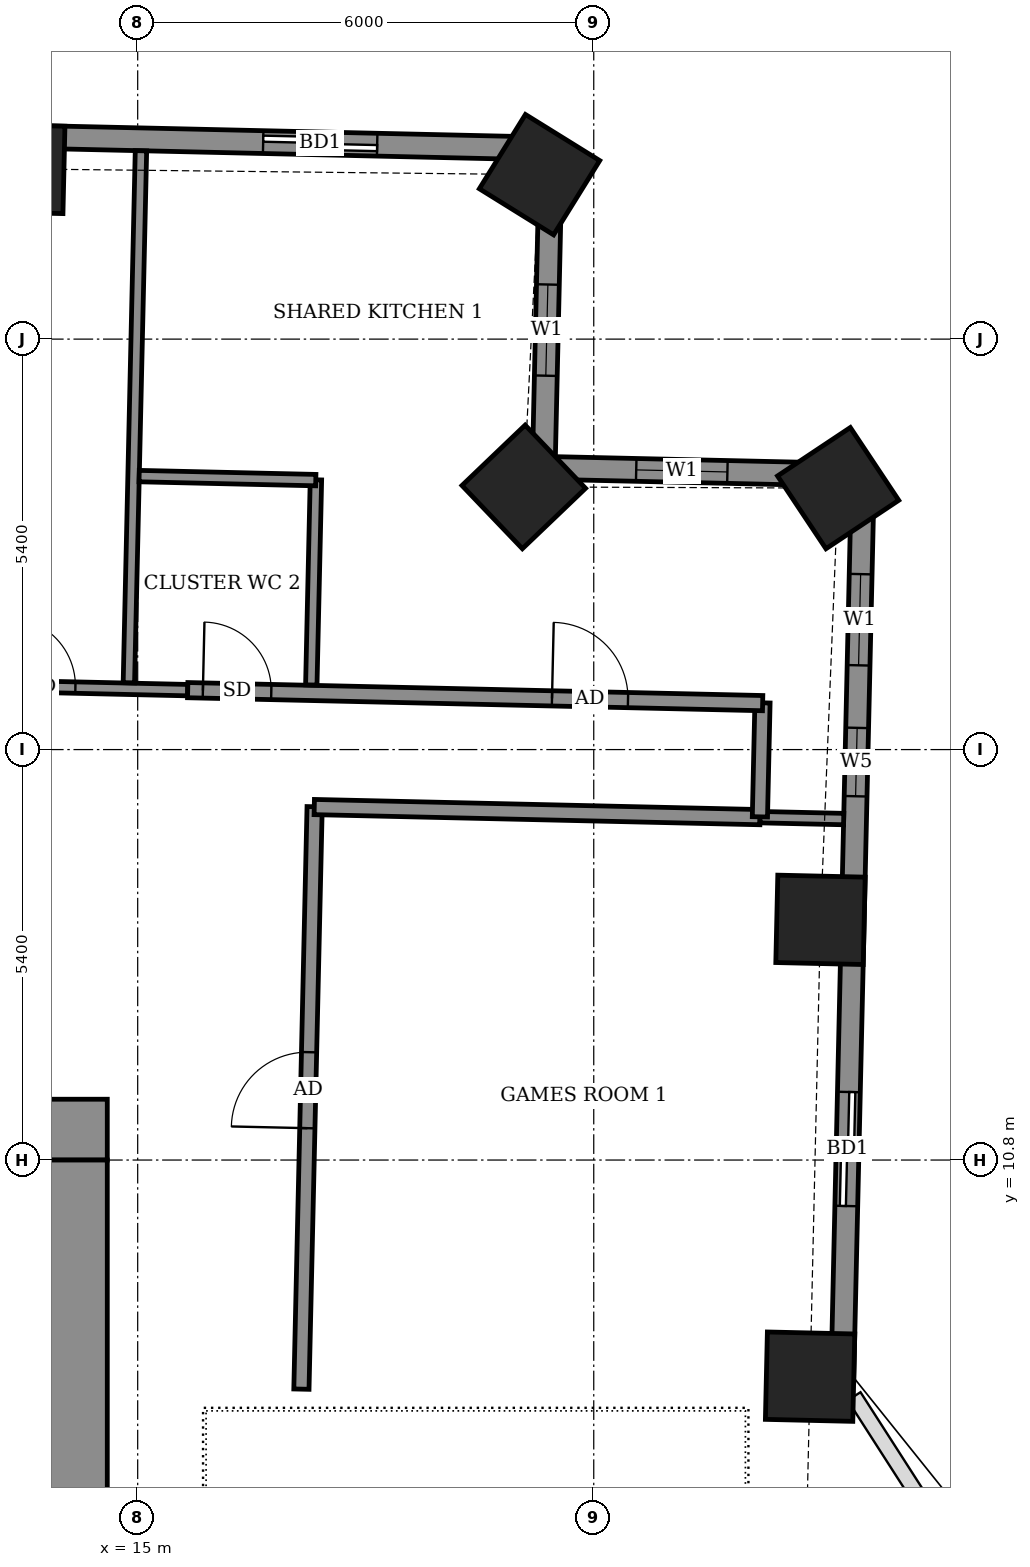
"""IFC4 building model, lengths in metres.
Left out: names, types, materials, properties, quantities, classifications, styles, units other than length and angle.
Written with IfcOpenShell. Run it as: python <this file> out.ifc"""

import sys

from ifc_helpers import new_model, si_unit, direction, frame, frame_2d, origin, origin_2d, place, context, subcontext, project, spatial, rectangle, extrude, element, fill, save


model = new_model("IFC4")
c1 = context("Model", 3, precision=1e-05, world=origin(), true_north=direction((0.0, 1.0)))
c2 = subcontext(c1, "Body", "Model", "MODEL_VIEW")
j1 = project(units=[si_unit("LENGTHUNIT", "METRE"), si_unit("PLANEANGLEUNIT", "RADIAN")], contexts=[c1])
p1 = place(None, origin())
s1 = spatial("IfcSite", under=j1, at=p1, CompositionType="ELEMENT")
p2 = place(p1, origin())
s2 = spatial("IfcBuilding", under=s1, at=p2, CompositionType="ELEMENT")
p3 = place(p2, frame((0.0, 0.0, 201.5)))
s3 = spatial("IfcBuildingStorey", under=s2, at=p3, CompositionType="ELEMENT", Elevation=201.5)
for number, where, z_axis, x_axis in (
    (1, (23.846, 7.95, -0.55), (0.0, 0.0, 1.0), (0.023, 1.0, 0.0)),
    (2, (23.983, 13.96, -0.55), (0.0, 0.0, 1.0), (0.023, 1.0, 0.0)),
    (3, (24.215, 19.639, -0.55), (0.0, 0.0, 1.0), (-0.554, 0.833, 0.0)),
    (4, (20.079, 19.656, -0.55), (0.0, 0.0, 1.0), (-0.691, 0.723, 0.0)),
    (5, (20.287, 23.763, -0.55), (0.0, 0.0, 1.0), (-0.85, 0.527, 0.0)),
    (6, (13.455, 23.839, -0.55), (0.0, 0.0, 1.0), (-1.0, 0.023, 0.0)),
):
    element("IfcColumn", number, at=place(p3, frame(where, z_axis=z_axis, x_axis=x_axis)), inside=s3, PredefinedType="COLUMN", context=c2, shape_type="SweptSolid", body=[
        extrude(rectangle(XDim=1.15, YDim=1.15, at=origin_2d()), origin(), (0.0, 0.0, 1.0), 3.6),
    ])
p4 = place(p3, frame((24.27, 7.885, 0.0), z_axis=(0.0, 0.0, 1.0), x_axis=(0.022715362207, 0.999741972871, 0.0)))
e7 = element("IfcWall", 7, at=p4, inside=s3, PredefinedType="SOLIDWALL", context=c2, shape_type="SweptSolid", body=[
    extrude(rectangle(XDim=11.93, YDim=0.3, at=frame_2d((5.965, 0.0))), origin(), (0.0, 0.0, 1.0), 3.05),
])
p5 = place(p4, frame((2.311, 0.0, 0.0)))
e8 = element("IfcOpeningElement", 8, at=p5, cuts=e7, PredefinedType="OPENING", context=c2, shape_type="SweptSolid", body=[
    extrude(rectangle(XDim=1.5, YDim=2.4, at=frame_2d((0.75, 1.2))), frame((0.0, 0.16, 0.0), z_axis=(0.0, -1.0, 0.0), x_axis=(1.0, 0.0, 0.0)), (0.0, 0.0, 1.0), 0.32),
])
p6 = place(p4, frame((7.703, 0.0, 0.9)))
e9 = element("IfcOpeningElement", 9, at=p6, cuts=e7, PredefinedType="OPENING", context=c2, shape_type="SweptSolid", body=[
    extrude(rectangle(XDim=0.9, YDim=1.5, at=frame_2d((0.45, 0.75))), frame((0.0, 0.16, 0.0), z_axis=(0.0, -1.0, 0.0), x_axis=(1.0, 0.0, 0.0)), (0.0, 0.0, 1.0), 0.32),
])
p7 = place(p4, frame((9.426, 0.0, 0.9)))
e10 = element("IfcOpeningElement", 10, at=p7, cuts=e7, PredefinedType="OPENING", context=c2, shape_type="SweptSolid", body=[
    extrude(rectangle(XDim=1.2, YDim=1.5, at=frame_2d((0.6, 0.75))), frame((0.0, 0.16, 0.0), z_axis=(0.0, -1.0, 0.0), x_axis=(1.0, 0.0, 0.0)), (0.0, 0.0, 1.0), 0.32),
])
p8 = place(p3, frame((24.541, 19.812, 0.0), z_axis=(0.0, 0.0, 1.0), x_axis=(-0.999744320311, 0.022611811187, 0.0)))
e11 = element("IfcWall", 11, at=p8, inside=s3, PredefinedType="SOLIDWALL", context=c2, shape_type="SweptSolid", body=[
    extrude(rectangle(XDim=4.2, YDim=0.3, at=frame_2d((2.1, 0.0))), origin(), (0.0, 0.0, 1.0), 2.55),
])
p9 = place(p8, frame((1.783, 0.0, 0.9)))
e12 = element("IfcOpeningElement", 12, at=p9, cuts=e11, PredefinedType="OPENING", context=c2, shape_type="SweptSolid", body=[
    extrude(rectangle(XDim=1.2, YDim=1.5, at=frame_2d((0.6, 0.75))), frame((0.0, 0.16, 0.0), z_axis=(0.0, -1.0, 0.0), x_axis=(1.0, 0.0, 0.0)), (0.0, 0.0, 1.0), 0.32),
])
p10 = place(p3, frame((20.342, 19.907, 0.0), z_axis=(0.0, 0.0, 1.0), x_axis=(0.022611811187, 0.999744320311, 0.0)))
e13 = element("IfcWall", 13, at=p10, inside=s3, PredefinedType="SOLIDWALL", context=c2, shape_type="SweptSolid", body=[
    extrude(rectangle(XDim=4.2, YDim=0.3, at=frame_2d((2.1, 0.0))), origin(), (0.0, 0.0, 1.0), 2.55),
])
p11 = place(p10, frame((1.212, 0.0, 0.9)))
e14 = element("IfcOpeningElement", 14, at=p11, cuts=e13, PredefinedType="OPENING", context=c2, shape_type="SweptSolid", body=[
    extrude(rectangle(XDim=1.2, YDim=1.5, at=frame_2d((0.6, 0.75))), frame((0.0, 0.16, 0.0), z_axis=(0.0, -1.0, 0.0), x_axis=(1.0, 0.0, 0.0)), (0.0, 0.0, 1.0), 0.32),
])
p12 = place(p3, frame((20.437, 24.106, 0.0), z_axis=(0.0, 0.0, 1.0), x_axis=(-0.999742506232, 0.022691875925, 0.0)))
e15 = element("IfcWall", 15, at=p12, inside=s3, PredefinedType="SOLIDWALL", context=c2, shape_type="SweptSolid", body=[
    extrude(rectangle(XDim=42.444, YDim=0.3, at=frame_2d((21.222, 0.0))), origin(), (0.0, 0.0, 1.0), 3.05),
])
p13 = place(p12, frame((2.287, 0.0, 0.0)))
e16 = element("IfcOpeningElement", 16, at=p13, cuts=e15, PredefinedType="OPENING", context=c2, shape_type="SweptSolid", body=[
    extrude(rectangle(XDim=1.5, YDim=2.4, at=frame_2d((0.75, 1.2))), frame((0.0, 0.16, 0.0), z_axis=(0.0, -1.0, 0.0), x_axis=(1.0, 0.0, 0.0)), (0.0, 0.0, 1.0), 0.32),
])
p14 = place(p12, frame((7.947, 0.0, 0.0)))
e17 = element("IfcOpeningElement", 17, at=p14, cuts=e15, PredefinedType="OPENING", context=c2, shape_type="SweptSolid", body=[
    extrude(rectangle(XDim=1.5, YDim=2.4, at=frame_2d((0.75, 1.2))), frame((0.0, 0.16, 0.0), z_axis=(0.0, -1.0, 0.0), x_axis=(1.0, 0.0, 0.0)), (0.0, 0.0, 1.0), 0.32),
])
p15 = place(p12, frame((11.184, 0.0, 0.0)))
e18 = element("IfcOpeningElement", 18, at=p15, cuts=e15, PredefinedType="OPENING", context=c2, shape_type="SweptSolid", body=[
    extrude(rectangle(XDim=1.5, YDim=2.4, at=frame_2d((0.75, 1.2))), frame((0.0, 0.16, 0.0), z_axis=(0.0, -1.0, 0.0), x_axis=(1.0, 0.0, 0.0)), (0.0, 0.0, 1.0), 0.32),
])
p16 = place(p12, frame((16.469, 0.0, 0.0)))
e19 = element("IfcOpeningElement", 19, at=p16, cuts=e15, PredefinedType="OPENING", context=c2, shape_type="SweptSolid", body=[
    extrude(rectangle(XDim=1.5, YDim=2.4, at=frame_2d((0.75, 1.2))), frame((0.0, 0.16, 0.0), z_axis=(0.0, -1.0, 0.0), x_axis=(1.0, 0.0, 0.0)), (0.0, 0.0, 1.0), 0.32),
])
p17 = place(p12, frame((22.02, 0.0, 0.0)))
e20 = element("IfcOpeningElement", 20, at=p17, cuts=e15, PredefinedType="OPENING", context=c2, shape_type="SweptSolid", body=[
    extrude(rectangle(XDim=1.5, YDim=2.4, at=frame_2d((0.75, 1.2))), frame((0.0, 0.16, 0.0), z_axis=(0.0, -1.0, 0.0), x_axis=(1.0, 0.0, 0.0)), (0.0, 0.0, 1.0), 0.32),
])
p18 = place(p12, frame((25.257, 0.0, 0.0)))
e21 = element("IfcOpeningElement", 21, at=p18, cuts=e15, PredefinedType="OPENING", context=c2, shape_type="SweptSolid", body=[
    extrude(rectangle(XDim=1.5, YDim=2.4, at=frame_2d((0.75, 1.2))), frame((0.0, 0.16, 0.0), z_axis=(0.0, -1.0, 0.0), x_axis=(1.0, 0.0, 0.0)), (0.0, 0.0, 1.0), 0.32),
])
p19 = place(p12, frame((30.057, 0.0, 0.0)))
e22 = element("IfcOpeningElement", 22, at=p19, cuts=e15, PredefinedType="OPENING", context=c2, shape_type="SweptSolid", body=[
    extrude(rectangle(XDim=1.5, YDim=2.4, at=frame_2d((0.75, 1.2))), frame((0.0, 0.16, 0.0), z_axis=(0.0, -1.0, 0.0), x_axis=(1.0, 0.0, 0.0)), (0.0, 0.0, 1.0), 0.32),
])
p20 = place(p12, frame((33.294, 0.0, 0.0)))
e23 = element("IfcOpeningElement", 23, at=p20, cuts=e15, PredefinedType="OPENING", context=c2, shape_type="SweptSolid", body=[
    extrude(rectangle(XDim=1.5, YDim=2.4, at=frame_2d((0.75, 1.2))), frame((0.0, 0.16, 0.0), z_axis=(0.0, -1.0, 0.0), x_axis=(1.0, 0.0, 0.0)), (0.0, 0.0, 1.0), 0.32),
])
p21 = place(p12, frame((38.484, 0.0, 0.9)))
e24 = element("IfcOpeningElement", 24, at=p21, cuts=e15, PredefinedType="OPENING", context=c2, shape_type="SweptSolid", body=[
    extrude(rectangle(XDim=2.4, YDim=1.5, at=frame_2d((1.2, 0.75))), frame((0.0, 0.16, 0.0), z_axis=(0.0, -1.0, 0.0), x_axis=(1.0, 0.0, 0.0)), (0.0, 0.0, 1.0), 0.32),
])
p22 = place(p3, frame((17.154, 7.786, 0.0), z_axis=(0.0, 0.0, 1.0), x_axis=(0.022680883318, 0.999742755679, 0.0)))
e25 = element("IfcWall", 25, at=p22, inside=s3, PredefinedType="PARTITIONING", context=c2, shape_type="SweptSolid", body=[
    extrude(rectangle(XDim=7.664, YDim=0.2, at=frame_2d((3.832, 0.0))), origin(), (0.0, 0.0, 1.0), 3.05),
])
p23 = place(p22, frame((3.434, 0.0, 0.0)))
e26 = element("IfcOpeningElement", 26, at=p23, cuts=e25, PredefinedType="OPENING", context=c2, shape_type="SweptSolid", body=[
    extrude(rectangle(XDim=1.0, YDim=2.1, at=frame_2d((0.5, 1.05))), frame((0.0, 0.11, 0.0), z_axis=(0.0, -1.0, 0.0), x_axis=(1.0, 0.0, 0.0)), (0.0, 0.0, 1.0), 0.22),
])
p24 = place(p3, frame((17.323, 15.444, 0.0), z_axis=(0.0, 0.0, 1.0), x_axis=(0.999742758565, -0.022680756085, 0.0)))
e27 = element("IfcWall", 27, at=p24, inside=s3, PredefinedType="PARTITIONING", context=c2, shape_type="SweptSolid", body=[
    extrude(rectangle(XDim=5.866, YDim=0.2, at=frame_2d((2.933, 0.0))), origin(), (0.0, 0.0, 1.0), 3.05),
])
p25 = place(p3, frame((23.188, 15.311, 0.0), z_axis=(0.0, 0.0, 1.0), x_axis=(0.999738848859, -0.022852441507, 0.0)))
e28 = element("IfcWall", 28, at=p25, inside=s3, PredefinedType="PARTITIONING", context=c2, shape_type="SweptSolid", body=[
    extrude(rectangle(XDim=1.1, YDim=0.15, at=frame_2d((0.55, 0.0))), origin(), (0.0, 0.0, 1.0), 2.55),
])
p26 = place(p3, frame((23.186, 15.315, 0.0), z_axis=(0.0, 0.0, 1.0), x_axis=(0.022617910375, 0.999744182344, 0.0)))
e29 = element("IfcWall", 29, at=p26, inside=s3, PredefinedType="PARTITIONING", context=c2, shape_type="SweptSolid", body=[
    extrude(rectangle(XDim=1.5, YDim=0.2, at=frame_2d((0.75, 0.0))), origin(), (0.0, 0.0, 1.0), 3.05),
])
p27 = place(p3, frame((-14.871, 17.675, 0.0), z_axis=(0.0, 0.0, 1.0), x_axis=(0.999742359486, -0.02269834024, 0.0)))
e30 = element("IfcWall", 30, at=p27, inside=s3, PredefinedType="PARTITIONING", context=c2, shape_type="SweptSolid", body=[
    extrude(rectangle(XDim=30.536, YDim=0.15, at=frame_2d((15.268, 0.0))), origin(), (0.0, 0.0, 1.0), 3.05),
])
p28 = place(p27, frame((28.159, 0.0, 0.0)))
e31 = element("IfcOpeningElement", 31, at=p28, cuts=e30, PredefinedType="OPENING", context=c2, shape_type="SweptSolid", body=[
    extrude(rectangle(XDim=0.9, YDim=2.1, at=frame_2d((0.45, 1.05))), frame((0.0, 0.085, 0.0), z_axis=(0.0, -1.0, 0.0), x_axis=(1.0, 0.0, 0.0)), (0.0, 0.0, 1.0), 0.17),
])
p29 = place(p27, frame((21.034, 0.0, 0.0)))
e32 = element("IfcOpeningElement", 32, at=p29, cuts=e30, PredefinedType="OPENING", context=c2, shape_type="SweptSolid", body=[
    extrude(rectangle(XDim=0.9, YDim=2.1, at=frame_2d((0.45, 1.05))), frame((0.0, 0.085, 0.0), z_axis=(0.0, -1.0, 0.0), x_axis=(1.0, 0.0, 0.0)), (0.0, 0.0, 1.0), 0.17),
])
p30 = place(p27, frame((18.684, 0.0, 0.0)))
e33 = element("IfcOpeningElement", 33, at=p30, cuts=e30, PredefinedType="OPENING", context=c2, shape_type="SweptSolid", body=[
    extrude(rectangle(XDim=0.9, YDim=2.1, at=frame_2d((0.45, 1.05))), frame((0.0, 0.085, 0.0), z_axis=(0.0, -1.0, 0.0), x_axis=(1.0, 0.0, 0.0)), (0.0, 0.0, 1.0), 0.17),
])
p31 = place(p27, frame((11.709, 0.0, 0.0)))
e34 = element("IfcOpeningElement", 34, at=p31, cuts=e30, PredefinedType="OPENING", context=c2, shape_type="SweptSolid", body=[
    extrude(rectangle(XDim=0.9, YDim=2.1, at=frame_2d((0.45, 1.05))), frame((0.0, 0.085, 0.0), z_axis=(0.0, -1.0, 0.0), x_axis=(1.0, 0.0, 0.0)), (0.0, 0.0, 1.0), 0.17),
])
p32 = place(p27, frame((9.734, 0.0, 0.0)))
e35 = element("IfcOpeningElement", 35, at=p32, cuts=e30, PredefinedType="OPENING", context=c2, shape_type="SweptSolid", body=[
    extrude(rectangle(XDim=0.9, YDim=2.1, at=frame_2d((0.45, 1.05))), frame((0.0, 0.085, 0.0), z_axis=(0.0, -1.0, 0.0), x_axis=(1.0, 0.0, 0.0)), (0.0, 0.0, 1.0), 0.17),
])
p33 = place(p27, frame((2.859, 0.0, 0.0)))
e36 = element("IfcOpeningElement", 36, at=p33, cuts=e30, PredefinedType="OPENING", context=c2, shape_type="SweptSolid", body=[
    extrude(rectangle(XDim=0.9, YDim=2.1, at=frame_2d((0.45, 1.05))), frame((0.0, 0.085, 0.0), z_axis=(0.0, -1.0, 0.0), x_axis=(1.0, 0.0, 0.0)), (0.0, 0.0, 1.0), 0.17),
])
p34 = place(p27, frame((0.584, 0.0, 0.0)))
e37 = element("IfcOpeningElement", 37, at=p34, cuts=e30, PredefinedType="OPENING", context=c2, shape_type="SweptSolid", body=[
    extrude(rectangle(XDim=0.9, YDim=2.1, at=frame_2d((0.45, 1.05))), frame((0.0, 0.085, 0.0), z_axis=(0.0, -1.0, 0.0), x_axis=(1.0, 0.0, 0.0)), (0.0, 0.0, 1.0), 0.17),
])
p35 = place(p3, frame((15.658, 16.982, 0.0), z_axis=(0.0, 0.0, 1.0), x_axis=(0.99974485859, -0.022587999516, 0.0)))
e38 = element("IfcWall", 38, at=p35, inside=s3, PredefinedType="PARTITIONING", context=c2, shape_type="SweptSolid", body=[
    extrude(rectangle(XDim=7.566, YDim=0.2, at=frame_2d((3.783, 0.0))), origin(), (0.0, 0.0, 1.0), 3.05),
])
p36 = place(p35, frame((4.794, 0.0, 0.0)))
e39 = element("IfcOpeningElement", 39, at=p36, cuts=e38, PredefinedType="OPENING", context=c2, shape_type="SweptSolid", body=[
    extrude(rectangle(XDim=1.0, YDim=2.1, at=frame_2d((0.5, 1.05))), frame((0.0, 0.11, 0.0), z_axis=(0.0, -1.0, 0.0), x_axis=(1.0, 0.0, 0.0)), (0.0, 0.0, 1.0), 0.22),
])
p37 = place(p35, frame((0.2, 0.0, 0.0)))
e40 = element("IfcOpeningElement", 40, at=p37, cuts=e38, PredefinedType="OPENING", context=c2, shape_type="SweptSolid", body=[
    extrude(rectangle(XDim=0.9, YDim=2.1, at=frame_2d((0.45, 1.05))), frame((0.0, 0.11, 0.0), z_axis=(0.0, -1.0, 0.0), x_axis=(1.0, 0.0, 0.0)), (0.0, 0.0, 1.0), 0.22),
])
p38 = place(p3, frame((14.884, 17.079, 0.0), z_axis=(0.0, 0.0, 1.0), x_axis=(0.022703185001, 0.999742249478, 0.0)))
e41 = element("IfcWall", 41, at=p38, inside=s3, PredefinedType="PARTITIONING", context=c2, shape_type="SweptSolid", body=[
    extrude(rectangle(XDim=7.0, YDim=0.15, at=frame_2d((3.5, 0.0))), origin(), (0.0, 0.0, 1.0), 2.55),
])
p39 = place(p3, frame((17.284, 17.05, 0.0), z_axis=(0.0, 0.0, 1.0), x_axis=(0.02260842146, 0.999744396973, 0.0)))
e42 = element("IfcWall", 42, at=p39, inside=s3, PredefinedType="PARTITIONING", context=c2, shape_type="SweptSolid", body=[
    extrude(rectangle(XDim=2.7, YDim=0.15, at=frame_2d((1.35, 0.0))), origin(), (0.0, 0.0, 1.0), 3.05),
])
p40 = place(p3, frame((15.019, 19.798, 0.0), z_axis=(0.0, 0.0, 1.0), x_axis=(0.999740260747, -0.02279059109, 0.0)))
e43 = element("IfcWall", 43, at=p40, inside=s3, PredefinedType="PARTITIONING", context=c2, shape_type="SweptSolid", body=[
    extrude(rectangle(XDim=2.324, YDim=0.15, at=frame_2d((1.162, 0.0))), origin(), (0.0, 0.0, 1.0), 3.05),
])
p41 = place(p3, frame((-14.6, 11.2, 0.0), z_axis=(0.0, 0.0, 1.0), x_axis=(1.0, 0.0, 0.0)))
e44 = element("IfcWall", 44, at=p41, inside=s3, PredefinedType="SHEAR", context=c2, shape_type="SweptSolid", body=[
    extrude(rectangle(XDim=29.2, YDim=0.8, at=frame_2d((14.6, 0.0))), origin(), (0.0, 0.0, 1.0), 3.6),
])
p42 = place(p3, frame((14.2, -10.8, 0.0), z_axis=(0.0, 0.0, 1.0), x_axis=(0.0, 1.0, 0.0)))
e45 = element("IfcWall", 45, at=p42, inside=s3, PredefinedType="SHEAR", context=c2, shape_type="SweptSolid", body=[
    extrude(rectangle(XDim=21.6, YDim=0.8, at=frame_2d((10.8, 0.0))), origin(), (0.0, 0.0, 1.0), 3.6),
])
p43 = place(p42, frame((1.2, 0.0, 0.0)))
e46 = element("IfcOpeningElement", 46, at=p43, cuts=e45, PredefinedType="OPENING", context=c2, shape_type="SweptSolid", body=[
    extrude(rectangle(XDim=1.2, YDim=2.1, at=frame_2d((0.6, 1.05))), frame((0.0, 0.41, 0.0), z_axis=(0.0, -1.0, 0.0), x_axis=(1.0, 0.0, 0.0)), (0.0, 0.0, 1.0), 0.82),
])
p44 = place(p5, origin())
e47 = element("IfcDoor", 47, at=p44, inside=s3, OperationType="SLIDING_TO_LEFT", PredefinedType="DOOR", context=c2, shape_type="SweptSolid", body=[
    extrude(rectangle(XDim=1.5, YDim=2.4, at=frame_2d((0.75, 1.2))), frame((0.0, 0.025, 0.0), z_axis=(0.0, -1.0, 0.0), x_axis=(1.0, 0.0, 0.0)), (0.0, 0.0, 1.0), 0.05),
])
fill(e8, e47)
p45 = place(p6, origin())
e48 = element("IfcWindow", 48, at=p45, inside=s3, PartitioningType="SINGLE_PANEL", PredefinedType="WINDOW", context=c2, shape_type="SweptSolid", body=[
    extrude(rectangle(XDim=0.9, YDim=1.5, at=frame_2d((0.45, 0.75))), frame((0.0, 0.03, 0.0), z_axis=(0.0, -1.0, 0.0), x_axis=(1.0, 0.0, 0.0)), (0.0, 0.0, 1.0), 0.06),
])
fill(e9, e48)
p46 = place(p7, origin())
e49 = element("IfcWindow", 49, at=p46, inside=s3, PartitioningType="SINGLE_PANEL", PredefinedType="WINDOW", context=c2, shape_type="SweptSolid", body=[
    extrude(rectangle(XDim=1.2, YDim=1.5, at=frame_2d((0.6, 0.75))), frame((0.0, 0.03, 0.0), z_axis=(0.0, -1.0, 0.0), x_axis=(1.0, 0.0, 0.0)), (0.0, 0.0, 1.0), 0.06),
])
fill(e10, e49)
p47 = place(p9, origin())
e50 = element("IfcWindow", 50, at=p47, inside=s3, PartitioningType="SINGLE_PANEL", PredefinedType="WINDOW", context=c2, shape_type="SweptSolid", body=[
    extrude(rectangle(XDim=1.2, YDim=1.5, at=frame_2d((0.6, 0.75))), frame((0.0, 0.03, 0.0), z_axis=(0.0, -1.0, 0.0), x_axis=(1.0, 0.0, 0.0)), (0.0, 0.0, 1.0), 0.06),
])
fill(e12, e50)
p48 = place(p11, origin())
e51 = element("IfcWindow", 51, at=p48, inside=s3, PartitioningType="SINGLE_PANEL", PredefinedType="WINDOW", context=c2, shape_type="SweptSolid", body=[
    extrude(rectangle(XDim=1.2, YDim=1.5, at=frame_2d((0.6, 0.75))), frame((0.0, 0.03, 0.0), z_axis=(0.0, -1.0, 0.0), x_axis=(1.0, 0.0, 0.0)), (0.0, 0.0, 1.0), 0.06),
])
fill(e14, e51)
p49 = place(p13, origin())
e52 = element("IfcDoor", 52, at=p49, inside=s3, OperationType="SLIDING_TO_LEFT", PredefinedType="DOOR", context=c2, shape_type="SweptSolid", body=[
    extrude(rectangle(XDim=1.5, YDim=2.4, at=frame_2d((0.75, 1.2))), frame((0.0, 0.025, 0.0), z_axis=(0.0, -1.0, 0.0), x_axis=(1.0, 0.0, 0.0)), (0.0, 0.0, 1.0), 0.05),
])
fill(e16, e52)
p50 = place(p23, origin())
e53 = element("IfcDoor", 53, at=p50, inside=s3, OperationType="SINGLE_SWING_RIGHT", PredefinedType="DOOR", context=c2, shape_type="SweptSolid", body=[
    extrude(rectangle(XDim=1.0, YDim=2.1, at=frame_2d((0.5, 1.05))), frame((0.0, 0.025, 0.0), z_axis=(0.0, -1.0, 0.0), x_axis=(1.0, 0.0, 0.0)), (0.0, 0.0, 1.0), 0.05),
])
fill(e26, e53)
p51 = place(p36, origin())
e54 = element("IfcDoor", 54, at=p51, inside=s3, OperationType="SINGLE_SWING_LEFT", PredefinedType="DOOR", context=c2, shape_type="SweptSolid", body=[
    extrude(rectangle(XDim=1.0, YDim=2.1, at=frame_2d((0.5, 1.05))), frame((0.0, 0.025, 0.0), z_axis=(0.0, -1.0, 0.0), x_axis=(1.0, 0.0, 0.0)), (0.0, 0.0, 1.0), 0.05),
])
fill(e39, e54)
p52 = place(p37, origin())
e55 = element("IfcDoor", 55, at=p52, inside=s3, OperationType="SINGLE_SWING_LEFT", PredefinedType="DOOR", context=c2, shape_type="SweptSolid", body=[
    extrude(rectangle(XDim=0.9, YDim=2.1, at=frame_2d((0.45, 1.05))), frame((0.0, 0.025, 0.0), z_axis=(0.0, -1.0, 0.0), x_axis=(1.0, 0.0, 0.0)), (0.0, 0.0, 1.0), 0.05),
])
fill(e40, e55)
p53 = place(p28, origin())
e56 = element("IfcDoor", 56, at=p53, inside=s3, OperationType="SINGLE_SWING_RIGHT", PredefinedType="DOOR", context=c2, shape_type="SweptSolid", body=[
    extrude(rectangle(XDim=0.9, YDim=2.1, at=frame_2d((0.45, 1.05))), frame((0.0, 0.025, 0.0), z_axis=(0.0, -1.0, 0.0), x_axis=(1.0, 0.0, 0.0)), (0.0, 0.0, 1.0), 0.05),
])
fill(e31, e56)
save(model, sys.argv[1])
